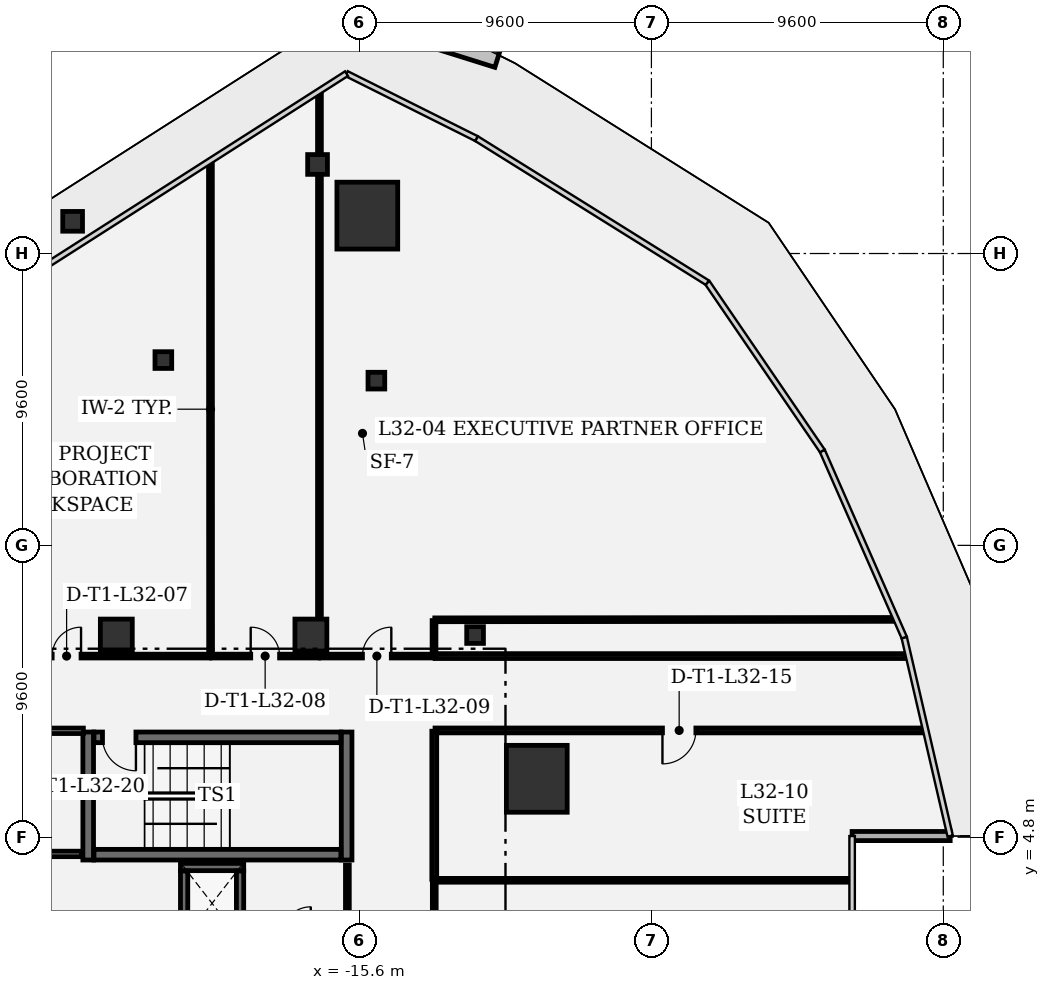
"""IFC4 building model, lengths in metres.
Left out: names, types, materials, properties, quantities, classifications, styles, units other than length and angle.
Written with IfcOpenShell. Run it as: python <this file> out.ifc"""

import sys

from ifc_helpers import new_model, si_unit, direction, frame, frame_2d, origin, origin_2d, place, context, subcontext, project, spatial, rectangle, extrude, element, fill, save


model = new_model("IFC4")
c1 = context("Model", 3, precision=1e-05, world=origin(), true_north=direction((0.0, 1.0)))
c2 = subcontext(c1, "Body", "Model", "MODEL_VIEW")
j1 = project(units=[si_unit("LENGTHUNIT", "METRE"), si_unit("PLANEANGLEUNIT", "RADIAN")], contexts=[c1])
p1 = place(None, origin())
s1 = spatial("IfcSite", under=j1, at=p1, CompositionType="ELEMENT")
p2 = place(p1, origin())
s2 = spatial("IfcBuilding", under=s1, at=p2, CompositionType="ELEMENT")
p3 = place(p2, frame((0.0, 0.0, 142.2)))
s3 = spatial("IfcBuildingStorey", under=s2, at=p3, CompositionType="ELEMENT", Elevation=142.2)
for number, where, z_axis, x_axis in (
    (1, (-9.77, 6.721, 0.0), (0.0, 0.0, 1.0), (1.0, 0.0, 0.0)),
    (2, (-15.344, 25.246, 0.0), (0.0, 0.0, 1.0), (1.0, 0.0, 0.0)),
):
    element("IfcColumn", number, at=place(p3, frame(where, z_axis=z_axis, x_axis=x_axis)), inside=s3, PredefinedType="COLUMN", context=c2, shape_type="SweptSolid", body=[
        extrude(rectangle(XDim=2.0, YDim=2.2, at=origin_2d()), origin(), (0.0, 0.0, 1.0), 4.05),
    ])
for number, where, z_axis, x_axis in (
    (3, (-23.6, 11.45, 0.0), (0.0, 0.0, 1.0), (1.0, 0.0, 0.0)),
    (4, (-17.2, 11.45, 0.0), (0.0, 0.0, 1.0), (1.0, 0.0, 0.0)),
):
    element("IfcColumn", number, at=place(p3, frame(where, z_axis=z_axis, x_axis=x_axis)), inside=s3, PredefinedType="COLUMN", context=c2, shape_type="SweptSolid", body=[
        extrude(rectangle(XDim=1.05, YDim=1.05, at=origin_2d()), origin(), (0.0, 0.0, 1.0), 4.05),
    ])
for number, where, z_axis, x_axis in (
    (5, (-25.038, 25.059, 0.0), (0.0, 0.0, 1.0), (1.0, 0.0, 0.0)),
    (6, (-16.981, 26.929, 0.0), (0.0, 0.0, 1.0), (1.0, 0.0, 0.0)),
):
    element("IfcColumn", number, at=place(p3, frame(where, z_axis=z_axis, x_axis=x_axis)), inside=s3, PredefinedType="COLUMN", context=c2, shape_type="SweptSolid", body=[
        extrude(rectangle(XDim=0.65, YDim=0.65, at=origin_2d()), origin(), (0.0, 0.0, 1.0), 4.05),
    ])
for number, where, z_axis, x_axis in (
    (7, (-22.053, 20.495, 0.0), (0.0, 0.0, 1.0), (1.0, 0.0, 0.0)),
    (8, (-15.046, 19.818, 0.0), (0.0, 0.0, 1.0), (1.0, 0.0, 0.0)),
    (9, (-11.8, 11.45, 0.0), (0.0, 0.0, 1.0), (1.0, 0.0, 0.0)),
):
    element("IfcColumn", number, at=place(p3, frame(where, z_axis=z_axis, x_axis=x_axis)), inside=s3, PredefinedType="COLUMN", context=c2, shape_type="SweptSolid", body=[
        extrude(rectangle(XDim=0.55, YDim=0.55, at=origin_2d()), origin(), (0.0, 0.0, 1.0), 4.05),
    ])
p4 = place(p3, frame((0.602, 4.838, 0.0), z_axis=(0.0, 0.0, 1.0), x_axis=(1.0, 0.0, 0.0)))
e10 = element("IfcWall", 10, at=p4, inside=s3, PredefinedType="SOLIDWALL", context=c2, shape_type="SweptSolid", body=[
    extrude(rectangle(XDim=3.226, YDim=0.3, at=frame_2d((1.613, 0.0))), origin(), (0.0, 0.0, 1.0), 3.78),
])
for number, where, z_axis, x_axis in (
    (11, (-24.525, 8.26, 0.0), (0.0, 0.0, 1.0), (0.0, -1.0, 0.0)),
    (12, (-16.025, 4.05, 0.0), (0.0, 0.0, 1.0), (0.0, 1.0, 0.0)),
):
    element("IfcWall", number, at=place(p3, frame(where, z_axis=z_axis, x_axis=x_axis)), inside=s3, PredefinedType="SHEAR", context=c2, shape_type="SweptSolid", body=[
        extrude(rectangle(XDim=4.21, YDim=0.35, at=frame_2d((2.105, 0.0))), origin(), (0.0, 0.0, 1.0), 3.78),
    ])
p5 = place(p3, frame((-24.335, 4.225, 0.0), z_axis=(0.0, 0.0, 1.0), x_axis=(1.0, 0.0, 0.0)))
e13 = element("IfcWall", 13, at=p5, inside=s3, PredefinedType="SHEAR", context=c2, shape_type="SweptSolid", body=[
    extrude(rectangle(XDim=8.12, YDim=0.35, at=frame_2d((4.06, 0.0))), origin(), (0.0, 0.0, 1.0), 3.78),
])
p6 = place(p3, frame((-16.215, 8.085, 0.0), z_axis=(0.0, 0.0, 1.0), x_axis=(-1.0, 0.0, 0.0)))
e14 = element("IfcWall", 14, at=p6, inside=s3, PredefinedType="SHEAR", context=c2, shape_type="SweptSolid", body=[
    extrude(rectangle(XDim=8.12, YDim=0.35, at=frame_2d((4.06, 0.0))), origin(), (0.0, 0.0, 1.0), 3.78),
])
p7 = place(p6, frame((6.74, 0.0, 0.0)))
e15 = element("IfcOpeningElement", 15, at=p7, cuts=e14, PredefinedType="OPENING", context=c2, shape_type="SweptSolid", body=[
    extrude(rectangle(XDim=1.1, YDim=2.2, at=frame_2d((0.55, 1.1))), frame((0.0, 0.185, 0.0), z_axis=(0.0, -1.0, 0.0), x_axis=(1.0, 0.0, 0.0)), (0.0, 0.0, 1.0), 0.37),
])
p8 = place(p3, frame((-21.49, 3.82, 0.0), z_axis=(0.0, 0.0, 1.0), x_axis=(1.0, 0.0, 0.0)))
e16 = element("IfcWall", 16, at=p8, inside=s3, PredefinedType="SHEAR", context=c2, shape_type="SweptSolid", body=[
    extrude(rectangle(XDim=2.08, YDim=0.24, at=frame_2d((1.04, 0.0))), origin(), (0.0, 0.0, 1.0), 3.78),
])
for number, where, z_axis, x_axis in (
    (17, (-21.37, 1.562, 0.0), (0.0, 0.0, 1.0), (0.0, 1.0, 0.0)),
    (18, (-19.53, 3.688, 0.0), (0.0, 0.0, 1.0), (0.0, -1.0, 0.0)),
):
    element("IfcWall", number, at=place(p3, frame(where, z_axis=z_axis, x_axis=x_axis)), inside=s3, PredefinedType="SHEAR", context=c2, shape_type="SweptSolid", body=[
        extrude(rectangle(XDim=2.126, YDim=0.24, at=frame_2d((1.063, 0.0))), origin(), (0.0, 0.0, 1.0), 3.78),
    ])
p9 = place(p3, frame((-28.355, 4.25, 0.0), z_axis=(0.0, 0.0, 1.0), x_axis=(1.0, 0.0, 0.0)))
e19 = element("IfcWall", 19, at=p9, inside=s3, PredefinedType="PARTITIONING", context=c2, shape_type="SweptSolid", body=[
    extrude(rectangle(XDim=3.622, YDim=0.18, at=frame_2d((1.811, 0.0))), origin(), (0.0, 0.0, 1.0), 3.78),
])
p10 = place(p3, frame((-24.684, 8.3, 0.0), z_axis=(0.0, 0.0, 1.0), x_axis=(-1.0, 0.0, 0.0)))
e20 = element("IfcWall", 20, at=p10, inside=s3, PredefinedType="PARTITIONING", context=c2, shape_type="SweptSolid", body=[
    extrude(rectangle(XDim=3.671, YDim=0.18, at=frame_2d((1.835, 0.0))), origin(), (0.0, 0.0, 1.0), 3.78),
])
p11 = place(p10, frame((1.335, 0.0, 0.0)))
e21 = element("IfcOpeningElement", 21, at=p11, cuts=e20, PredefinedType="OPENING", context=c2, shape_type="SweptSolid", body=[
    extrude(rectangle(XDim=1.0, YDim=2.15, at=frame_2d((0.5, 1.075))), frame((0.0, 0.1, 0.0), z_axis=(0.0, -1.0, 0.0), x_axis=(1.0, 0.0, 0.0)), (0.0, 0.0, 1.0), 0.2),
])
p12 = place(p3, frame((-16.0, 1.585, 0.0), z_axis=(0.0, 0.0, 1.0), x_axis=(0.0, 1.0, 0.0)))
e22 = element("IfcWall", 22, at=p12, inside=s3, PredefinedType="PARTITIONING", context=c2, shape_type="SweptSolid", body=[
    extrude(rectangle(XDim=2.302, YDim=0.125, at=frame_2d((1.151, 0.0))), origin(), (0.0, 0.0, 1.0), 3.78),
])
p13 = place(p3, frame((-29.946, 10.758, 0.0), z_axis=(0.0, 0.0, 1.0), x_axis=(1.0, 0.0, 0.0)))
e23 = element("IfcWall", 23, at=p13, inside=s3, PredefinedType="PARTITIONING", context=c2, shape_type="SweptSolid", body=[
    extrude(rectangle(XDim=9.421, YDim=0.125, at=frame_2d((4.711, 0.0))), origin(), (0.0, 0.0, 1.0), 3.78),
])
p14 = place(p13, frame((4.236, 0.0, 0.0)))
e24 = element("IfcOpeningElement", 24, at=p14, cuts=e23, PredefinedType="OPENING", context=c2, shape_type="SweptSolid", body=[
    extrude(rectangle(XDim=0.95, YDim=2.15, at=frame_2d((0.475, 1.075))), frame((0.0, 0.073, 0.0), z_axis=(0.0, -1.0, 0.0), x_axis=(1.0, 0.0, 0.0)), (0.0, 0.0, 1.0), 0.145),
])
p15 = place(p3, frame((-20.499, 10.783, 0.0), z_axis=(0.0, 0.0, 1.0), x_axis=(-0.000346792899, 0.999999939867, 0.0)))
e25 = element("IfcWall", 25, at=p15, inside=s3, PredefinedType="PARTITIONING", context=c2, shape_type="SweptSolid", body=[
    extrude(rectangle(XDim=16.192, YDim=0.125, at=frame_2d((8.096, 0.0))), origin(), (0.0, 0.0, 1.0), 2.895),
])
p16 = place(p3, frame((-20.466, 10.758, 0.0), z_axis=(0.0, 0.0, 1.0), x_axis=(1.0, 0.0, 0.0)))
e26 = element("IfcWall", 26, at=p16, inside=s3, PredefinedType="PARTITIONING", context=c2, shape_type="SweptSolid", body=[
    extrude(rectangle(XDim=3.523, YDim=0.125, at=frame_2d((1.761, 0.0))), origin(), (0.0, 0.0, 1.0), 3.78),
])
p17 = place(p16, frame((1.286, 0.0, 0.0)))
e27 = element("IfcOpeningElement", 27, at=p17, cuts=e26, PredefinedType="OPENING", context=c2, shape_type="SweptSolid", body=[
    extrude(rectangle(XDim=0.95, YDim=2.15, at=frame_2d((0.475, 1.075))), frame((0.0, 0.073, 0.0), z_axis=(0.0, -1.0, 0.0), x_axis=(1.0, 0.0, 0.0)), (0.0, 0.0, 1.0), 0.145),
])
p18 = place(p3, frame((-16.919, 12.04, 0.0), z_axis=(0.0, 0.0, 1.0), x_axis=(0.0, 1.0, 0.0)))
e28 = element("IfcWall", 28, at=p18, inside=s3, PredefinedType="PARTITIONING", context=c2, shape_type="SweptSolid", body=[
    extrude(rectangle(XDim=14.499, YDim=0.125, at=frame_2d((7.25, 0.0))), origin(), (0.0, 0.0, 1.0), 2.895),
])
p19 = place(p3, frame((-16.919, 27.319, 0.0), z_axis=(0.0, 0.0, 1.0), x_axis=(0.0, 1.0, 0.0)))
e29 = element("IfcWall", 29, at=p19, inside=s3, PredefinedType="PARTITIONING", context=c2, shape_type="SweptSolid", body=[
    extrude(rectangle(XDim=1.948, YDim=0.125, at=frame_2d((0.974, 0.0))), origin(), (0.0, 0.0, 1.0), 3.78),
])
p20 = place(p3, frame((-16.885, 10.758, 0.0), z_axis=(0.0, 0.0, 1.0), x_axis=(1.0, 0.0, 0.0)))
e30 = element("IfcWall", 30, at=p20, inside=s3, PredefinedType="PARTITIONING", context=c2, shape_type="SweptSolid", body=[
    extrude(rectangle(XDim=3.711, YDim=0.125, at=frame_2d((1.855, 0.0))), origin(), (0.0, 0.0, 1.0), 2.895),
])
p21 = place(p20, frame((1.38, 0.0, 0.0)))
e31 = element("IfcOpeningElement", 31, at=p21, cuts=e30, PredefinedType="OPENING", context=c2, shape_type="SweptSolid", body=[
    extrude(rectangle(XDim=0.95, YDim=2.15, at=frame_2d((0.475, 1.075))), frame((0.0, 0.073, 0.0), z_axis=(0.0, -1.0, 0.0), x_axis=(1.0, 0.0, 0.0)), (0.0, 0.0, 1.0), 0.145),
])
p22 = place(p3, frame((-13.15, 11.926, 0.0), z_axis=(0.0, 0.0, 1.0), x_axis=(0.0, -1.0, 0.0)))
e32 = element("IfcWall", 32, at=p22, inside=s3, PredefinedType="PARTITIONING", context=c2, shape_type="SweptSolid", body=[
    extrude(rectangle(XDim=1.143, YDim=0.125, at=frame_2d((0.572, 0.0))), origin(), (0.0, 0.0, 1.0), 3.78),
])
p23 = place(p3, frame((-13.125, 11.951, 0.0), z_axis=(0.0, 0.0, 1.0), x_axis=(0.999999646529, 0.000840797814, 0.0)))
e33 = element("IfcWall", 33, at=p23, inside=s3, PredefinedType="PARTITIONING", context=c2, shape_type="SweptSolid", body=[
    extrude(rectangle(XDim=15.099, YDim=0.125, at=frame_2d((7.55, 0.0))), origin(), (0.0, 0.0, 1.0), 3.78),
])
p24 = place(p3, frame((0.521, 3.383, 0.0), z_axis=(0.0, 0.0, 1.0), x_axis=(-1.0, 0.0, 0.0)))
e34 = element("IfcWall", 34, at=p24, inside=s3, PredefinedType="PARTITIONING", context=c2, shape_type="SweptSolid", body=[
    extrude(rectangle(XDim=13.639, YDim=0.125, at=frame_2d((6.819, 0.0))), origin(), (0.0, 0.0, 1.0), 3.78),
])
p25 = place(p3, frame((-13.142, 3.358, 0.0), z_axis=(0.0, 0.0, 1.0), x_axis=(0.0, -1.0, 0.0)))
e35 = element("IfcWall", 35, at=p25, inside=s3, PredefinedType="PARTITIONING", context=c2, shape_type="SweptSolid", body=[
    extrude(rectangle(XDim=10.222, YDim=0.125, at=frame_2d((5.111, 0.0))), origin(), (0.0, 0.0, 1.0), 3.78),
])
p26 = place(p25, frame((4.636, 0.0, 0.0)))
e36 = element("IfcOpeningElement", 36, at=p26, cuts=e35, PredefinedType="OPENING", context=c2, shape_type="SweptSolid", body=[
    extrude(rectangle(XDim=0.95, YDim=2.15, at=frame_2d((0.475, 1.075))), frame((0.0, 0.073, 0.0), z_axis=(0.0, -1.0, 0.0), x_axis=(1.0, 0.0, 0.0)), (0.0, 0.0, 1.0), 0.145),
])
p27 = place(p3, frame((2.377, 10.758, 0.0), z_axis=(0.0, 0.0, 1.0), x_axis=(-1.0, 0.0, 0.0)))
e37 = element("IfcWall", 37, at=p27, inside=s3, PredefinedType="PARTITIONING", context=c2, shape_type="SweptSolid", body=[
    extrude(rectangle(XDim=15.494, YDim=0.16, at=frame_2d((7.747, 0.0))), origin(), (0.0, 0.0, 1.0), 3.78),
])
p28 = place(p3, frame((2.943, 8.312, 0.0), z_axis=(0.0, 0.0, 1.0), x_axis=(-1.0, 0.0, 0.0)))
e38 = element("IfcWall", 38, at=p28, inside=s3, PredefinedType="PARTITIONING", context=c2, shape_type="SweptSolid", body=[
    extrude(rectangle(XDim=16.06, YDim=0.16, at=frame_2d((8.03, 0.0))), origin(), (0.0, 0.0, 1.0), 2.895),
])
p29 = place(p28, frame((7.48, 0.0, 0.0)))
e39 = element("IfcOpeningElement", 39, at=p29, cuts=e38, PredefinedType="OPENING", context=c2, shape_type="SweptSolid", body=[
    extrude(rectangle(XDim=1.1, YDim=2.15, at=frame_2d((0.55, 1.075))), frame((0.0, 0.09, 0.0), z_axis=(0.0, -1.0, 0.0), x_axis=(1.0, 0.0, 0.0)), (0.0, 0.0, 1.0), 0.18),
])
p30 = place(p3, frame((-13.142, 8.287, 0.0), z_axis=(0.0, 0.0, 1.0), x_axis=(0.0, -1.0, 0.0)))
e40 = element("IfcWall", 40, at=p30, inside=s3, PredefinedType="PARTITIONING", context=c2, shape_type="SweptSolid", body=[
    extrude(rectangle(XDim=4.871, YDim=0.16, at=frame_2d((2.436, 0.0))), origin(), (0.0, 0.0, 1.0), 3.78),
])
p31 = place(p7, origin())
e41 = element("IfcDoor", 41, at=p31, inside=s3, OperationType="SINGLE_SWING_LEFT", PredefinedType="DOOR", context=c2, shape_type="SweptSolid", body=[
    extrude(rectangle(XDim=1.1, YDim=2.2, at=frame_2d((0.55, 1.1))), frame((0.0, 0.025, 0.0), z_axis=(0.0, -1.0, 0.0), x_axis=(1.0, 0.0, 0.0)), (0.0, 0.0, 1.0), 0.05),
])
fill(e15, e41)
p32 = place(p14, origin())
e42 = element("IfcDoor", 42, at=p32, inside=s3, OperationType="SINGLE_SWING_RIGHT", PredefinedType="DOOR", context=c2, shape_type="SweptSolid", body=[
    extrude(rectangle(XDim=0.95, YDim=2.15, at=frame_2d((0.475, 1.075))), frame((0.0, 0.025, 0.0), z_axis=(0.0, -1.0, 0.0), x_axis=(1.0, 0.0, 0.0)), (0.0, 0.0, 1.0), 0.05),
])
fill(e24, e42)
p33 = place(p17, origin())
e43 = element("IfcDoor", 43, at=p33, inside=s3, OperationType="SINGLE_SWING_LEFT", PredefinedType="DOOR", context=c2, shape_type="SweptSolid", body=[
    extrude(rectangle(XDim=0.95, YDim=2.15, at=frame_2d((0.475, 1.075))), frame((0.0, 0.025, 0.0), z_axis=(0.0, -1.0, 0.0), x_axis=(1.0, 0.0, 0.0)), (0.0, 0.0, 1.0), 0.05),
])
fill(e27, e43)
p34 = place(p21, origin())
e44 = element("IfcDoor", 44, at=p34, inside=s3, OperationType="SINGLE_SWING_RIGHT", PredefinedType="DOOR", context=c2, shape_type="SweptSolid", body=[
    extrude(rectangle(XDim=0.95, YDim=2.15, at=frame_2d((0.475, 1.075))), frame((0.0, 0.025, 0.0), z_axis=(0.0, -1.0, 0.0), x_axis=(1.0, 0.0, 0.0)), (0.0, 0.0, 1.0), 0.05),
])
fill(e31, e44)
p35 = place(p29, origin())
e45 = element("IfcDoor", 45, at=p35, inside=s3, OperationType="SINGLE_SWING_RIGHT", PredefinedType="DOOR", context=c2, shape_type="SweptSolid", body=[
    extrude(rectangle(XDim=1.1, YDim=2.15, at=frame_2d((0.55, 1.075))), frame((0.0, 0.025, 0.0), z_axis=(0.0, -1.0, 0.0), x_axis=(1.0, 0.0, 0.0)), (0.0, 0.0, 1.0), 0.05),
])
fill(e39, e45)
save(model, sys.argv[1])
